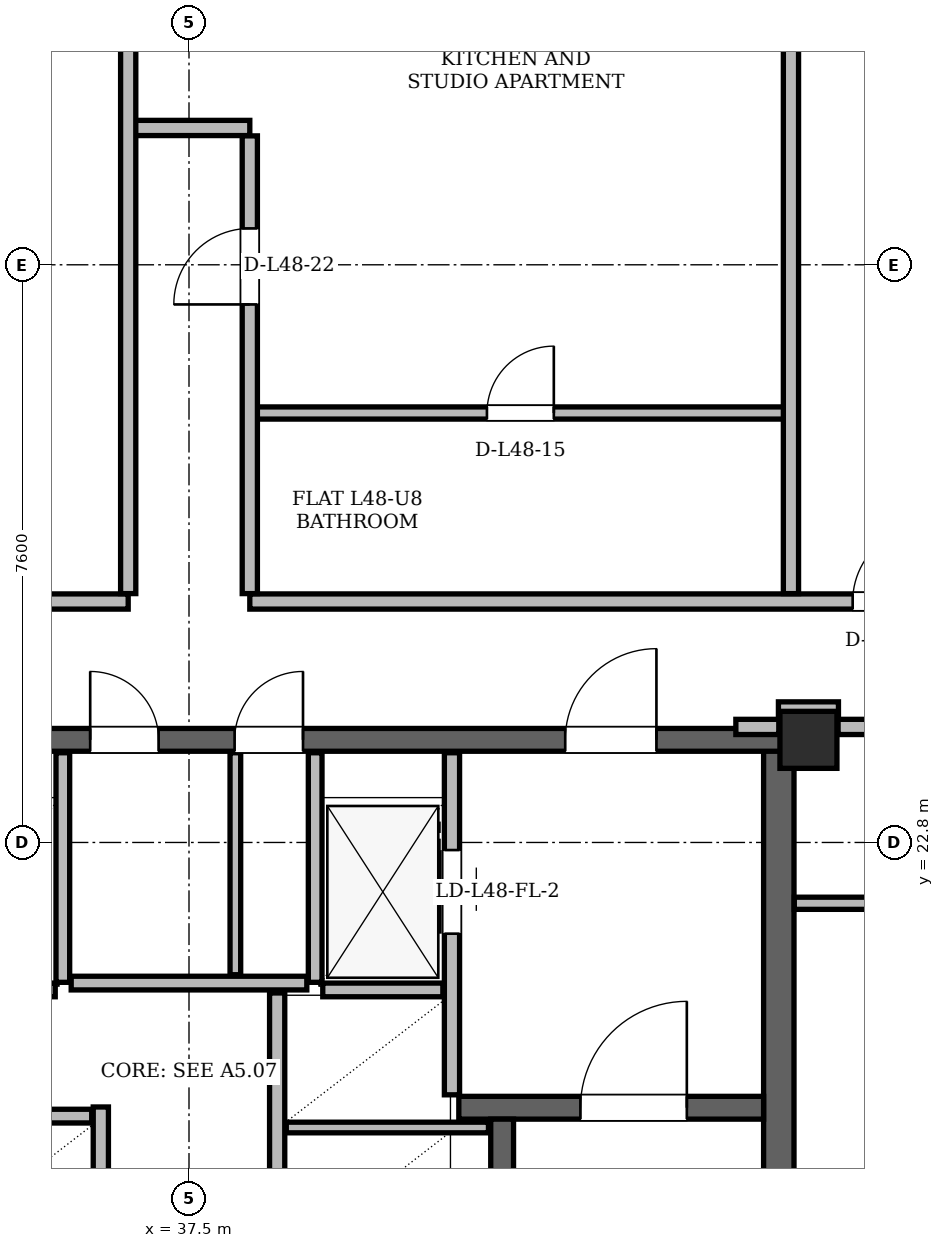
"""IFC4 building model, lengths in metres.
Left out: names, types, materials, properties, quantities, classifications, styles, units other than length and angle.
Written with IfcOpenShell. Run it as: python <this file> out.ifc"""

import sys

from ifc_helpers import new_model, si_unit, direction, frame, frame_2d, origin, origin_2d, place, context, subcontext, project, spatial, rectangle, hollow_rectangle, extrude, element, fill, save


model = new_model("IFC4")
c1 = context("Model", 3, precision=1e-05, world=origin(), true_north=direction((0.0, 1.0)))
c2 = subcontext(c1, "Body", "Model", "MODEL_VIEW")
j1 = project(units=[si_unit("LENGTHUNIT", "METRE"), si_unit("PLANEANGLEUNIT", "RADIAN")], contexts=[c1])
p1 = place(None, origin())
s1 = spatial("IfcSite", under=j1, at=p1, CompositionType="ELEMENT")
p2 = place(p1, origin())
s2 = spatial("IfcBuilding", under=s1, at=p2, CompositionType="ELEMENT")
p3 = place(p2, frame((0.0, 0.0, 181.8)))
s3 = spatial("IfcBuildingStorey", under=s2, at=p3, CompositionType="ELEMENT", Elevation=181.8)
p4 = place(p3, frame((45.65, 24.15, 0.0), z_axis=(0.0, 0.0, 1.0), x_axis=(1.0, 0.0, 0.0)))
e1 = element("IfcColumn", 1, at=p4, inside=s3, PredefinedType="COLUMN", context=c2, shape_type="SweptSolid", body=[
    extrude(hollow_rectangle(XDim=0.75, YDim=0.75, WallThickness=0.06, at=origin_2d()), origin(), (0.0, 0.0, 1.0), 3.6),
])
p5 = place(p3, frame((45.26, 11.0, 0.0), z_axis=(0.0, 0.0, 1.0), x_axis=(0.0, 1.0, 0.0)))
e2 = element("IfcWall", 2, at=p5, inside=s3, PredefinedType="SHEAR", context=c2, shape_type="SweptSolid", body=[
    extrude(rectangle(XDim=13.3, YDim=0.4, at=frame_2d((6.65, 0.0))), origin(), (0.0, 0.0, 1.0), 3.38),
])
p6 = place(p3, frame((29.65, 24.15, 0.0), z_axis=(0.0, 0.0, 1.0), x_axis=(1.0, 0.0, 0.0)))
e3 = element("IfcWall", 3, at=p6, inside=s3, PredefinedType="SHEAR", context=c2, shape_type="SweptSolid", body=[
    extrude(rectangle(XDim=15.7, YDim=0.3, at=frame_2d((7.85, 0.0))), origin(), (0.0, 0.0, 1.0), 3.38),
])
p7 = place(p6, frame((1.7, 0.0, 0.0)))
e4 = element("IfcOpeningElement", 4, at=p7, cuts=e3, PredefinedType="OPENING", context=c2, shape_type="SweptSolid", body=[
    extrude(rectangle(XDim=1.2, YDim=2.2, at=frame_2d((0.6, 1.1))), frame((0.0, 0.15, 0.0), z_axis=(0.0, -1.0, 0.0), x_axis=(1.0, 0.0, 0.0)), (0.0, 0.0, 1.0), 0.3),
])
p8 = place(p6, frame((12.8, 0.0, 0.0)))
e5 = element("IfcOpeningElement", 5, at=p8, cuts=e3, PredefinedType="OPENING", context=c2, shape_type="SweptSolid", body=[
    extrude(rectangle(XDim=1.2, YDim=2.2, at=frame_2d((0.6, 1.1))), frame((0.0, 0.15, 0.0), z_axis=(0.0, -1.0, 0.0), x_axis=(1.0, 0.0, 0.0)), (0.0, 0.0, 1.0), 0.3),
])
p9 = place(p6, frame((6.55, 0.0, 0.0)))
e6 = element("IfcOpeningElement", 6, at=p9, cuts=e3, PredefinedType="OPENING", context=c2, shape_type="SweptSolid", body=[
    extrude(rectangle(XDim=0.9, YDim=2.05, at=frame_2d((0.45, 1.025))), frame((0.0, 0.15, 0.0), z_axis=(0.0, -1.0, 0.0), x_axis=(1.0, 0.0, 0.0)), (0.0, 0.0, 1.0), 0.3),
])
p10 = place(p6, frame((8.45, 0.0, 0.0)))
e7 = element("IfcOpeningElement", 7, at=p10, cuts=e3, PredefinedType="OPENING", context=c2, shape_type="SweptSolid", body=[
    extrude(rectangle(XDim=0.9, YDim=2.05, at=frame_2d((0.45, 1.025))), frame((0.0, 0.15, 0.0), z_axis=(0.0, -1.0, 0.0), x_axis=(1.0, 0.0, 0.0)), (0.0, 0.0, 1.0), 0.3),
])
p11 = place(p3, frame((41.05, 19.31, 0.0), z_axis=(0.0, 0.0, 1.0), x_axis=(1.0, 0.0, 0.0)))
e8 = element("IfcWall", 8, at=p11, inside=s3, PredefinedType="SHEAR", context=c2, shape_type="SweptSolid", body=[
    extrude(rectangle(XDim=4.01, YDim=0.3, at=frame_2d((2.005, 0.0))), origin(), (0.0, 0.0, 1.0), 3.38),
])
p12 = place(p11, frame((1.6, 0.0, 0.0)))
e9 = element("IfcOpeningElement", 9, at=p12, cuts=e8, PredefinedType="OPENING", context=c2, shape_type="SweptSolid", body=[
    extrude(rectangle(XDim=1.4, YDim=2.2, at=frame_2d((0.7, 1.1))), frame((0.0, 0.15, 0.0), z_axis=(0.0, -1.0, 0.0), x_axis=(1.0, 0.0, 0.0)), (0.0, 0.0, 1.0), 0.3),
])
p13 = place(p3, frame((41.62, 11.54, 0.0), z_axis=(0.0, 0.0, 1.0), x_axis=(0.0, 1.0, 0.0)))
e10 = element("IfcWall", 10, at=p13, inside=s3, PredefinedType="SHEAR", context=c2, shape_type="SweptSolid", body=[
    extrude(rectangle(XDim=7.62, YDim=0.3, at=frame_2d((3.81, 0.0))), origin(), (0.0, 0.0, 1.0), 3.38),
])
p14 = place(p3, frame((59.565, 12.024, 0.0), z_axis=(0.0, 0.0, 1.0), x_axis=(-0.499997559055, 0.86602681306, 0.0)))
e11 = element("IfcWall", 11, at=p14, inside=s3, PredefinedType="SOLIDWALL", context=c2, shape_type="SweptSolid", body=[
    extrude(rectangle(XDim=36.054, YDim=0.29, at=frame_2d((18.027, 0.0))), origin(), (0.0, 0.0, 1.0), 2.6),
])
p15 = place(p14, frame((3.429, 0.0, 0.0)))
e12 = element("IfcOpeningElement", 12, at=p15, cuts=e11, PredefinedType="OPENING", context=c2, shape_type="SweptSolid", body=[
    extrude(rectangle(XDim=1.5, YDim=2.2, at=frame_2d((0.75, 1.1))), frame((0.0, 0.145, 0.0), z_axis=(0.0, -1.0, 0.0), x_axis=(1.0, 0.0, 0.0)), (0.0, 0.0, 1.0), 0.29),
])
p16 = place(p14, frame((27.779, 0.0, 0.0)))
e13 = element("IfcOpeningElement", 13, at=p16, cuts=e11, PredefinedType="OPENING", context=c2, shape_type="SweptSolid", body=[
    extrude(rectangle(XDim=1.5, YDim=2.2, at=frame_2d((0.75, 1.1))), frame((0.0, 0.145, 0.0), z_axis=(0.0, -1.0, 0.0), x_axis=(1.0, 0.0, 0.0)), (0.0, 0.0, 1.0), 0.29),
])
p17 = place(p14, frame((1.672, 0.0, 0.85)))
e14 = element("IfcOpeningElement", 14, at=p17, cuts=e11, PredefinedType="OPENING", context=c2, shape_type="SweptSolid", body=[
    extrude(rectangle(XDim=1.2, YDim=1.48, at=frame_2d((0.6, 0.74))), frame((0.0, 0.145, 0.0), z_axis=(0.0, -1.0, 0.0), x_axis=(1.0, 0.0, 0.0)), (0.0, 0.0, 1.0), 0.29),
])
p18 = place(p14, frame((14.332, 0.0, 0.85)))
e15 = element("IfcOpeningElement", 15, at=p18, cuts=e11, PredefinedType="OPENING", context=c2, shape_type="SweptSolid", body=[
    extrude(rectangle(XDim=1.2, YDim=1.48, at=frame_2d((0.6, 0.74))), frame((0.0, 0.145, 0.0), z_axis=(0.0, -1.0, 0.0), x_axis=(1.0, 0.0, 0.0)), (0.0, 0.0, 1.0), 0.29),
])
p19 = place(p14, frame((21.605, 0.0, 0.85)))
e16 = element("IfcOpeningElement", 16, at=p19, cuts=e11, PredefinedType="OPENING", context=c2, shape_type="SweptSolid", body=[
    extrude(rectangle(XDim=2.8, YDim=1.64, at=frame_2d((1.4, 0.82))), frame((0.0, 0.145, 0.0), z_axis=(0.0, -1.0, 0.0), x_axis=(1.0, 0.0, 0.0)), (0.0, 0.0, 1.0), 0.29),
])
p20 = place(p14, frame((7.301, 0.0, 0.85)))
e17 = element("IfcOpeningElement", 17, at=p20, cuts=e11, PredefinedType="OPENING", context=c2, shape_type="SweptSolid", body=[
    extrude(rectangle(XDim=1.2, YDim=1.48, at=frame_2d((0.6, 0.74))), frame((0.0, 0.145, 0.0), z_axis=(0.0, -1.0, 0.0), x_axis=(1.0, 0.0, 0.0)), (0.0, 0.0, 1.0), 0.29),
])
p21 = place(p14, frame((25.885, 0.0, 0.85)))
e18 = element("IfcOpeningElement", 18, at=p21, cuts=e11, PredefinedType="OPENING", context=c2, shape_type="SweptSolid", body=[
    extrude(rectangle(XDim=1.2, YDim=1.48, at=frame_2d((0.6, 0.74))), frame((0.0, 0.145, 0.0), z_axis=(0.0, -1.0, 0.0), x_axis=(1.0, 0.0, 0.0)), (0.0, 0.0, 1.0), 0.29),
])
p22 = place(p14, frame((32.282, 0.0, 0.85)))
e19 = element("IfcOpeningElement", 19, at=p22, cuts=e11, PredefinedType="OPENING", context=c2, shape_type="SweptSolid", body=[
    extrude(rectangle(XDim=1.6, YDim=1.64, at=frame_2d((0.8, 0.82))), frame((0.0, 0.145, 0.0), z_axis=(0.0, -1.0, 0.0), x_axis=(1.0, 0.0, 0.0)), (0.0, 0.0, 1.0), 0.29),
])
p23 = place(p3, frame((35.84, 20.96, 0.0), z_axis=(0.0, 0.0, 1.0), x_axis=(0.0, 1.0, 0.0)))
e20 = element("IfcWall", 20, at=p23, inside=s3, PredefinedType="PARTITIONING", context=c2, shape_type="SweptSolid", body=[
    extrude(rectangle(XDim=3.02, YDim=0.18, at=frame_2d((1.51, 0.0))), origin(), (0.0, 0.0, 1.0), 3.38),
])
p24 = place(p3, frame((34.16, 20.86, 0.0), z_axis=(0.0, 0.0, 1.0), x_axis=(1.0, 0.0, 0.0)))
e21 = element("IfcWall", 21, at=p24, inside=s3, PredefinedType="PARTITIONING", context=c2, shape_type="SweptSolid", body=[
    extrude(rectangle(XDim=1.58, YDim=0.18, at=frame_2d((0.79, 0.0))), origin(), (0.0, 0.0, 1.0), 3.38),
])
p25 = place(p3, frame((40.96, 19.48, 0.0), z_axis=(0.0, 0.0, 1.0), x_axis=(0.0, 1.0, 0.0)))
e22 = element("IfcWall", 22, at=p25, inside=s3, PredefinedType="PARTITIONING", context=c2, shape_type="SweptSolid", body=[
    extrude(rectangle(XDim=4.5, YDim=0.2, at=frame_2d((2.25, 0.0))), origin(), (0.0, 0.0, 1.0), 3.38),
])
p26 = place(p25, frame((2.12, 0.0, 0.0)))
e23 = element("IfcOpeningElement", 23, at=p26, cuts=e22, PredefinedType="OPENING", context=c2, shape_type="SweptSolid", body=[
    extrude(rectangle(XDim=1.1, YDim=2.2, at=frame_2d((0.55, 1.1))), frame((0.0, 0.1, 0.0), z_axis=(0.0, -1.0, 0.0), x_axis=(1.0, 0.0, 0.0)), (0.0, 0.0, 1.0), 0.2),
])
p27 = place(p3, frame((39.16, 20.96, 0.0), z_axis=(0.0, 0.0, 1.0), x_axis=(0.0, 1.0, 0.0)))
e24 = element("IfcWall", 24, at=p27, inside=s3, PredefinedType="PARTITIONING", context=c2, shape_type="SweptSolid", body=[
    extrude(rectangle(XDim=3.02, YDim=0.18, at=frame_2d((1.51, 0.0))), origin(), (0.0, 0.0, 1.0), 3.38),
])
p28 = place(p3, frame((39.26, 20.86, 0.0), z_axis=(0.0, 0.0, 1.0), x_axis=(1.0, 0.0, 0.0)))
e25 = element("IfcWall", 25, at=p28, inside=s3, PredefinedType="PARTITIONING", context=c2, shape_type="SweptSolid", body=[
    extrude(rectangle(XDim=1.58, YDim=0.18, at=frame_2d((0.79, 0.0))), origin(), (0.0, 0.0, 1.0), 3.38),
])
p29 = place(p3, frame((36.34, 17.25, 0.0), z_axis=(0.0, 0.0, 1.0), x_axis=(0.0, 1.0, 0.0)))
e26 = element("IfcWall", 26, at=p29, inside=s3, PredefinedType="PARTITIONING", context=c2, shape_type="SweptSolid", body=[
    extrude(rectangle(XDim=2.07, YDim=0.2, at=frame_2d((1.035, 0.0))), origin(), (0.0, 0.0, 1.0), 3.38),
])
p30 = place(p3, frame((33.95, 19.2, 0.0), z_axis=(0.0, 0.0, 1.0), x_axis=(1.0, 0.0, 0.0)))
e27 = element("IfcWall", 27, at=p30, inside=s3, PredefinedType="PARTITIONING", context=c2, shape_type="SweptSolid", body=[
    extrude(rectangle(XDim=2.27, YDim=0.18, at=frame_2d((1.135, 0.0))), origin(), (0.0, 0.0, 1.0), 3.38),
])
p31 = place(p3, frame((38.66, 11.72, 0.0), z_axis=(0.0, 0.0, 1.0), x_axis=(0.0, 1.0, 0.0)))
e28 = element("IfcWall", 28, at=p31, inside=s3, PredefinedType="PARTITIONING", context=c2, shape_type="SweptSolid", body=[
    extrude(rectangle(XDim=9.1, YDim=0.2, at=frame_2d((4.55, 0.0))), origin(), (0.0, 0.0, 1.0), 3.38),
])
p32 = place(p31, frame((0.255, 0.0, 0.0)))
e29 = element("IfcOpeningElement", 29, at=p32, cuts=e28, PredefinedType="OPENING", context=c2, shape_type="SweptSolid", body=[
    extrude(rectangle(XDim=1.05, YDim=2.15, at=frame_2d((0.525, 1.075))), frame((0.0, 0.1, 0.0), z_axis=(0.0, -1.0, 0.0), x_axis=(1.0, 0.0, 0.0)), (0.0, 0.0, 1.0), 0.2),
])
p33 = place(p31, frame((2.105, 0.0, 0.0)))
e30 = element("IfcOpeningElement", 30, at=p33, cuts=e28, PredefinedType="OPENING", context=c2, shape_type="SweptSolid", body=[
    extrude(rectangle(XDim=1.05, YDim=2.15, at=frame_2d((0.525, 1.075))), frame((0.0, 0.1, 0.0), z_axis=(0.0, -1.0, 0.0), x_axis=(1.0, 0.0, 0.0)), (0.0, 0.0, 1.0), 0.2),
])
p34 = place(p31, frame((3.955, 0.0, 0.0)))
e31 = element("IfcOpeningElement", 31, at=p34, cuts=e28, PredefinedType="OPENING", context=c2, shape_type="SweptSolid", body=[
    extrude(rectangle(XDim=1.05, YDim=2.15, at=frame_2d((0.525, 1.075))), frame((0.0, 0.1, 0.0), z_axis=(0.0, -1.0, 0.0), x_axis=(1.0, 0.0, 0.0)), (0.0, 0.0, 1.0), 0.2),
])
p35 = place(p3, frame((38.78, 19.05, 0.0), z_axis=(0.0, 0.0, 1.0), x_axis=(1.0, 0.0, 0.0)))
e32 = element("IfcWall", 32, at=p35, inside=s3, PredefinedType="PARTITIONING", context=c2, shape_type="SweptSolid", body=[
    extrude(rectangle(XDim=2.66, YDim=0.14, at=frame_2d((1.33, 0.0))), origin(), (0.0, 0.0, 1.0), 3.38),
])
p36 = place(p3, frame((35.95, 20.95, 0.0), z_axis=(0.0, 0.0, 1.0), x_axis=(1.0, 0.0, 0.0)))
e33 = element("IfcWall", 33, at=p36, inside=s3, PredefinedType="PARTITIONING", context=c2, shape_type="SweptSolid", body=[
    extrude(rectangle(XDim=3.1, YDim=0.18, at=frame_2d((1.55, 0.0))), origin(), (0.0, 0.0, 1.0), 3.38),
])
p37 = place(p3, frame((38.11, 21.06, 0.0), z_axis=(0.0, 0.0, 1.0), x_axis=(0.0, 1.0, 0.0)))
e34 = element("IfcWall", 34, at=p37, inside=s3, PredefinedType="PARTITIONING", context=c2, shape_type="SweptSolid", body=[
    extrude(rectangle(XDim=2.92, YDim=0.14, at=frame_2d((1.46, 0.0))), origin(), (0.0, 0.0, 1.0), 3.38),
])
p38 = place(p3, frame((45.464, 22.0, 0.0), z_axis=(0.0, 0.0, 1.0), x_axis=(1.0, 0.0, 0.0)))
e35 = element("IfcWall", 35, at=p38, inside=s3, PredefinedType="PARTITIONING", context=c2, shape_type="SweptSolid", body=[
    extrude(rectangle(XDim=8.169, YDim=0.16, at=frame_2d((4.085, 0.0))), origin(), (0.0, 0.0, 1.0), 2.52),
])
p39 = place(p38, frame((1.617, 0.0, 0.0)))
e36 = element("IfcOpeningElement", 36, at=p39, cuts=e35, PredefinedType="OPENING", context=c2, shape_type="SweptSolid", body=[
    extrude(rectangle(XDim=0.92, YDim=2.12, at=frame_2d((0.46, 1.06))), frame((0.0, 0.08, 0.0), z_axis=(0.0, -1.0, 0.0), x_axis=(1.0, 0.0, 0.0)), (0.0, 0.0, 1.0), 0.16),
])
p40 = place(p38, frame((4.778, 0.0, 0.0)))
e37 = element("IfcOpeningElement", 37, at=p40, cuts=e35, PredefinedType="OPENING", context=c2, shape_type="SweptSolid", body=[
    extrude(rectangle(XDim=0.95, YDim=2.1, at=frame_2d((0.475, 1.05))), frame((0.0, 0.08, 0.0), z_axis=(0.0, -1.0, 0.0), x_axis=(1.0, 0.0, 0.0)), (0.0, 0.0, 1.0), 0.16),
])
p41 = place(p38, frame((6.628, 0.0, 0.0)))
e38 = element("IfcOpeningElement", 38, at=p41, cuts=e35, PredefinedType="OPENING", context=c2, shape_type="SweptSolid", body=[
    extrude(rectangle(XDim=0.88, YDim=2.08, at=frame_2d((0.44, 1.04))), frame((0.0, 0.08, 0.0), z_axis=(0.0, -1.0, 0.0), x_axis=(1.0, 0.0, 0.0)), (0.0, 0.0, 1.0), 0.16),
])
p42 = place(p3, frame((44.695, 24.32, 0.0), z_axis=(0.0, 0.0, 1.0), x_axis=(1.0, 0.0, 0.0)))
e39 = element("IfcWall", 39, at=p42, inside=s3, PredefinedType="PARTITIONING", context=c2, shape_type="SweptSolid", body=[
    extrude(rectangle(XDim=0.565, YDim=0.2, at=frame_2d((0.282, 0.0))), origin(), (0.0, 0.0, 1.0), 2.52),
])
p43 = place(p3, frame((46.04, 24.32, 0.0), z_axis=(0.0, 0.0, 1.0), x_axis=(1.0, 0.0, 0.0)))
e40 = element("IfcWall", 40, at=p43, inside=s3, PredefinedType="PARTITIONING", context=c2, shape_type="SweptSolid", body=[
    extrude(rectangle(XDim=2.76, YDim=0.2, at=frame_2d((1.38, 0.0))), origin(), (0.0, 0.0, 1.0), 3.38),
])
p44 = place(p3, frame((45.255, 24.55, 0.0), z_axis=(0.0, 0.0, 1.0), x_axis=(1.0, 0.0, 0.0)))
e41 = element("IfcWall", 41, at=p44, inside=s3, PredefinedType="PARTITIONING", context=c2, shape_type="SweptSolid", body=[
    extrude(rectangle(XDim=0.79, YDim=0.2, at=frame_2d((0.395, 0.0))), origin(), (0.0, 0.0, 1.0), 2.842),
])
p45 = place(p3, frame((27.55, 25.97, 0.0), z_axis=(0.0, 0.0, 1.0), x_axis=(1.0, 0.0, 0.0)))
e42 = element("IfcWall", 42, at=p45, inside=s3, PredefinedType="PARTITIONING", context=c2, shape_type="SweptSolid", body=[
    extrude(rectangle(XDim=9.15, YDim=0.2, at=frame_2d((4.575, 0.0))), origin(), (0.0, 0.0, 1.0), 2.842),
])
p46 = place(p45, frame((4.001, 0.0, 0.0)))
e43 = element("IfcOpeningElement", 43, at=p46, cuts=e42, PredefinedType="OPENING", context=c2, shape_type="SweptSolid", body=[
    extrude(rectangle(XDim=1.0, YDim=2.18, at=frame_2d((0.5, 1.09))), frame((0.0, 0.1, 0.0), z_axis=(0.0, -1.0, 0.0), x_axis=(1.0, 0.0, 0.0)), (0.0, 0.0, 1.0), 0.2),
])
p47 = place(p3, frame((38.3, 25.97, 0.0), z_axis=(0.0, 0.0, 1.0), x_axis=(1.0, 0.0, 0.0)))
e44 = element("IfcWall", 44, at=p47, inside=s3, PredefinedType="PARTITIONING", context=c2, shape_type="SweptSolid", body=[
    extrude(rectangle(XDim=10.5, YDim=0.2, at=frame_2d((5.25, 0.0))), origin(), (0.0, 0.0, 1.0), 2.842),
])
p48 = place(p47, frame((7.932, 0.0, 0.0)))
e45 = element("IfcOpeningElement", 45, at=p48, cuts=e44, PredefinedType="OPENING", context=c2, shape_type="SweptSolid", body=[
    extrude(rectangle(XDim=1.0, YDim=2.18, at=frame_2d((0.5, 1.09))), frame((0.0, 0.1, 0.0), z_axis=(0.0, -1.0, 0.0), x_axis=(1.0, 0.0, 0.0)), (0.0, 0.0, 1.0), 0.2),
])
p49 = place(p3, frame((38.218, 28.45, 0.0), z_axis=(0.0, 0.0, 1.0), x_axis=(1.0, 0.0, 0.0)))
e46 = element("IfcWall", 46, at=p49, inside=s3, PredefinedType="PARTITIONING", context=c2, shape_type="SweptSolid", body=[
    extrude(rectangle(XDim=7.284, YDim=0.16, at=frame_2d((3.642, 0.0))), origin(), (0.0, 0.0, 1.0), 2.842),
])
p50 = place(p49, frame((3.202, 0.0, 0.0)))
e47 = element("IfcOpeningElement", 47, at=p50, cuts=e46, PredefinedType="OPENING", context=c2, shape_type="SweptSolid", body=[
    extrude(rectangle(XDim=0.88, YDim=2.08, at=frame_2d((0.44, 1.04))), frame((0.0, 0.08, 0.0), z_axis=(0.0, -1.0, 0.0), x_axis=(1.0, 0.0, 0.0)), (0.0, 0.0, 1.0), 0.16),
])
p51 = place(p3, frame((36.7, 32.2, 0.0), z_axis=(0.0, 0.0, 1.0), x_axis=(1.0, 0.0, 0.0)))
e48 = element("IfcWall", 48, at=p51, inside=s3, PredefinedType="PARTITIONING", context=c2, shape_type="SweptSolid", body=[
    extrude(rectangle(XDim=1.6, YDim=0.2, at=frame_2d((0.8, 0.0))), origin(), (0.0, 0.0, 1.0), 3.38),
])
p52 = place(p3, frame((36.7, 26.074, 0.0), z_axis=(0.0, 0.0, 1.0), x_axis=(0.0, 1.0, 0.0)))
e49 = element("IfcWall", 49, at=p52, inside=s3, PredefinedType="PARTITIONING", context=c2, shape_type="SweptSolid", body=[
    extrude(rectangle(XDim=17.024, YDim=0.2, at=frame_2d((8.512, 0.0))), origin(), (0.0, 0.0, 1.0), 3.38),
])
p53 = place(p3, frame((38.3, 26.074, 0.0), z_axis=(0.0, 0.0, 1.0), x_axis=(0.0, 1.0, 0.0)))
e50 = element("IfcWall", 50, at=p53, inside=s3, PredefinedType="PARTITIONING", context=c2, shape_type="SweptSolid", body=[
    extrude(rectangle(XDim=6.022, YDim=0.2, at=frame_2d((3.011, 0.0))), origin(), (0.0, 0.0, 1.0), 3.38),
])
p54 = place(p53, frame((3.804, 0.0, 0.0)))
e51 = element("IfcOpeningElement", 51, at=p54, cuts=e50, PredefinedType="OPENING", context=c2, shape_type="SweptSolid", body=[
    extrude(rectangle(XDim=1.0, YDim=2.18, at=frame_2d((0.5, 1.09))), frame((0.0, 0.1, 0.0), z_axis=(0.0, -1.0, 0.0), x_axis=(1.0, 0.0, 0.0)), (0.0, 0.0, 1.0), 0.2),
])
p55 = place(p3, frame((45.42, 26.074, 0.0), z_axis=(0.0, 0.0, 1.0), x_axis=(0.0, 1.0, 0.0)))
e52 = element("IfcWall", 52, at=p55, inside=s3, PredefinedType="PARTITIONING", context=c2, shape_type="SweptSolid", body=[
    extrude(rectangle(XDim=10.152, YDim=0.2, at=frame_2d((5.076, 0.0))), origin(), (0.0, 0.0, 1.0), 2.6),
])
p56 = place(p26, origin())
e53 = element("IfcDoor", 53, at=p56, inside=s3, OperationType="SLIDING_TO_RIGHT", PredefinedType="DOOR", context=c2, shape_type="SweptSolid", body=[
    extrude(rectangle(XDim=1.1, YDim=2.2, at=frame_2d((0.55, 1.1))), frame((0.0, 0.025, 0.0), z_axis=(0.0, -1.0, 0.0), x_axis=(1.0, 0.0, 0.0)), (0.0, 0.0, 1.0), 0.05),
])
fill(e23, e53)
p57 = place(p12, origin())
e54 = element("IfcDoor", 54, at=p57, inside=s3, OperationType="SINGLE_SWING_RIGHT", PredefinedType="DOOR", context=c2, shape_type="SweptSolid", body=[
    extrude(rectangle(XDim=1.4, YDim=2.2, at=frame_2d((0.7, 1.1))), frame((0.0, 0.025, 0.0), z_axis=(0.0, -1.0, 0.0), x_axis=(1.0, 0.0, 0.0)), (0.0, 0.0, 1.0), 0.05),
])
fill(e9, e54)
p58 = place(p8, origin())
e55 = element("IfcDoor", 55, at=p58, inside=s3, OperationType="SINGLE_SWING_RIGHT", PredefinedType="DOOR", context=c2, shape_type="SweptSolid", body=[
    extrude(rectangle(XDim=1.2, YDim=2.2, at=frame_2d((0.6, 1.1))), frame((0.0, 0.025, 0.0), z_axis=(0.0, -1.0, 0.0), x_axis=(1.0, 0.0, 0.0)), (0.0, 0.0, 1.0), 0.05),
])
fill(e5, e55)
p59 = place(p9, origin())
e56 = element("IfcDoor", 56, at=p59, inside=s3, OperationType="SINGLE_SWING_LEFT", PredefinedType="DOOR", context=c2, shape_type="SweptSolid", body=[
    extrude(rectangle(XDim=0.9, YDim=2.05, at=frame_2d((0.45, 1.025))), frame((0.0, 0.025, 0.0), z_axis=(0.0, -1.0, 0.0), x_axis=(1.0, 0.0, 0.0)), (0.0, 0.0, 1.0), 0.05),
])
fill(e6, e56)
p60 = place(p10, origin())
e57 = element("IfcDoor", 57, at=p60, inside=s3, OperationType="SINGLE_SWING_RIGHT", PredefinedType="DOOR", context=c2, shape_type="SweptSolid", body=[
    extrude(rectangle(XDim=0.9, YDim=2.05, at=frame_2d((0.45, 1.025))), frame((0.0, 0.025, 0.0), z_axis=(0.0, -1.0, 0.0), x_axis=(1.0, 0.0, 0.0)), (0.0, 0.0, 1.0), 0.05),
])
fill(e7, e57)
p61 = place(p48, origin())
e58 = element("IfcDoor", 58, at=p61, inside=s3, OperationType="SINGLE_SWING_RIGHT", PredefinedType="DOOR", context=c2, shape_type="SweptSolid", body=[
    extrude(rectangle(XDim=1.0, YDim=2.18, at=frame_2d((0.5, 1.09))), frame((0.0, 0.025, 0.0), z_axis=(0.0, -1.0, 0.0), x_axis=(1.0, 0.0, 0.0)), (0.0, 0.0, 1.0), 0.05),
])
fill(e45, e58)
p62 = place(p50, origin())
e59 = element("IfcDoor", 59, at=p62, inside=s3, OperationType="SINGLE_SWING_RIGHT", PredefinedType="DOOR", context=c2, shape_type="SweptSolid", body=[
    extrude(rectangle(XDim=0.88, YDim=2.08, at=frame_2d((0.44, 1.04))), frame((0.0, 0.025, 0.0), z_axis=(0.0, -1.0, 0.0), x_axis=(1.0, 0.0, 0.0)), (0.0, 0.0, 1.0), 0.05),
])
fill(e47, e59)
p63 = place(p54, origin())
e60 = element("IfcDoor", 60, at=p63, inside=s3, OperationType="SINGLE_SWING_LEFT", PredefinedType="DOOR", context=c2, shape_type="SweptSolid", body=[
    extrude(rectangle(XDim=1.0, YDim=2.18, at=frame_2d((0.5, 1.09))), frame((0.0, 0.025, 0.0), z_axis=(0.0, -1.0, 0.0), x_axis=(1.0, 0.0, 0.0)), (0.0, 0.0, 1.0), 0.05),
])
fill(e51, e60)
save(model, sys.argv[1])
